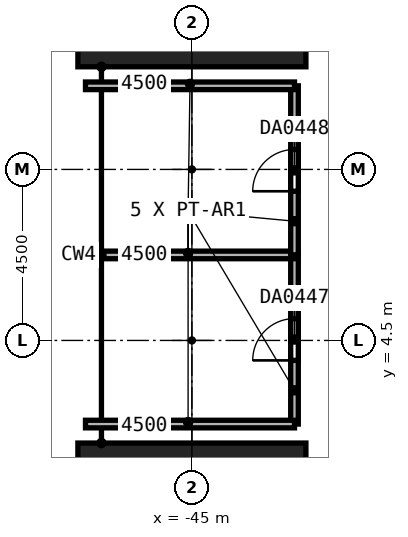
"""IFC4 building model, lengths in metres.
Left out: names, types, materials, properties, quantities, classifications, styles, units other than length and angle.
Written with IfcOpenShell. Run it as: python <this file> out.ifc"""

import sys

from ifc_helpers import new_model, si_unit, direction, frame, frame_2d, origin, origin_2d, place, context, subcontext, project, spatial, rectangle, extrude, element, fill, save


model = new_model("IFC4")
c1 = context("Model", 3, precision=1e-05, world=origin(), true_north=direction((0.0, 1.0)))
c2 = subcontext(c1, "Body", "Model", "MODEL_VIEW")
j1 = project(units=[si_unit("LENGTHUNIT", "METRE"), si_unit("PLANEANGLEUNIT", "RADIAN")], contexts=[c1])
p1 = place(None, origin())
s1 = spatial("IfcSite", under=j1, at=p1, CompositionType="ELEMENT")
p2 = place(p1, origin())
s2 = spatial("IfcBuilding", under=s1, at=p2, CompositionType="ELEMENT")
p3 = place(p2, frame((0.0, 0.0, 37.0)))
s3 = spatial("IfcBuildingStorey", under=s2, at=p3, CompositionType="ELEMENT", Elevation=37.0)
for number, where, z_axis, x_axis in (
    (1, (-45.0, 0.0, 0.0), (0.0, 0.0, 1.0), (0.0, 1.0, 0.0)),
    (2, (-45.0, 13.5, 0.0), (0.0, 0.0, 1.0), (0.0, 1.0, 0.0)),
):
    element("IfcColumn", number, at=place(p3, frame(where, z_axis=z_axis, x_axis=x_axis)), inside=s3, PredefinedType="COLUMN", context=c2, shape_type="SweptSolid", body=[
        extrude(rectangle(XDim=3.6, YDim=6.0, at=origin_2d()), origin(), (0.0, 0.0, 1.0), 5.8),
    ])
p4 = place(p3, frame((-42.3, 2.3, 0.0), z_axis=(0.0, 0.0, 1.0), x_axis=(0.0, 1.0, 0.0)))
e3 = element("IfcWall", 3, at=p4, inside=s3, PredefinedType="PARTITIONING", context=c2, shape_type="SweptSolid", body=[
    extrude(rectangle(XDim=4.45, YDim=0.2, at=frame_2d((2.225, 0.0))), origin(), (0.0, 0.0, 1.0), 6.7),
])
p5 = place(p4, frame((1.675, 0.0, 0.0)))
e4 = element("IfcOpeningElement", 4, at=p5, cuts=e3, PredefinedType="OPENING", context=c2, shape_type="SweptSolid", body=[
    extrude(rectangle(XDim=1.1, YDim=2.4, at=frame_2d((0.55, 1.2))), frame((0.0, 0.1, 0.0), z_axis=(0.0, -1.0, 0.0), x_axis=(1.0, 0.0, 0.0)), (0.0, 0.0, 1.0), 0.2),
])
for number, where, z_axis, x_axis in (
    (5, (-42.3, 2.3, 0.0), (0.0, 0.0, 1.0), (-1.0, 0.0, 0.0)),
    (6, (-47.8, 6.75, 0.0), (0.0, 0.0, 1.0), (1.0, 0.0, 0.0)),
):
    element("IfcWall", number, at=place(p3, frame(where, z_axis=z_axis, x_axis=x_axis)), inside=s3, PredefinedType="PARTITIONING", context=c2, shape_type="SweptSolid", body=[
        extrude(rectangle(XDim=5.5, YDim=0.2, at=frame_2d((2.75, 0.0))), origin(), (0.0, 0.0, 1.0), 6.7),
    ])
p6 = place(p3, frame((-42.3, 6.75, 0.0), z_axis=(0.0, 0.0, 1.0), x_axis=(0.0, 1.0, 0.0)))
e7 = element("IfcWall", 7, at=p6, inside=s3, PredefinedType="PARTITIONING", context=c2, shape_type="SweptSolid", body=[
    extrude(rectangle(XDim=4.45, YDim=0.2, at=frame_2d((2.225, 0.0))), origin(), (0.0, 0.0, 1.0), 6.7),
])
p7 = place(p6, frame((1.675, 0.0, 0.0)))
e8 = element("IfcOpeningElement", 8, at=p7, cuts=e7, PredefinedType="OPENING", context=c2, shape_type="SweptSolid", body=[
    extrude(rectangle(XDim=1.1, YDim=2.4, at=frame_2d((0.55, 1.2))), frame((0.0, 0.1, 0.0), z_axis=(0.0, -1.0, 0.0), x_axis=(1.0, 0.0, 0.0)), (0.0, 0.0, 1.0), 0.2),
])
p8 = place(p3, frame((-42.3, 11.2, 0.0), z_axis=(0.0, 0.0, 1.0), x_axis=(-1.0, 0.0, 0.0)))
e9 = element("IfcWall", 9, at=p8, inside=s3, PredefinedType="PARTITIONING", context=c2, shape_type="SweptSolid", body=[
    extrude(rectangle(XDim=5.5, YDim=0.2, at=frame_2d((2.75, 0.0))), origin(), (0.0, 0.0, 1.0), 6.7),
])
p9 = place(p5, origin())
e10 = element("IfcDoor", 10, at=p9, inside=s3, OperationType="DOUBLE_DOOR_SINGLE_SWING", PredefinedType="DOOR", context=c2, shape_type="SweptSolid", body=[
    extrude(rectangle(XDim=1.1, YDim=2.4, at=frame_2d((0.55, 1.2))), frame((0.0, 0.025, 0.0), z_axis=(0.0, -1.0, 0.0), x_axis=(1.0, 0.0, 0.0)), (0.0, 0.0, 1.0), 0.05),
])
fill(e4, e10)
p10 = place(p7, origin())
e11 = element("IfcDoor", 11, at=p10, inside=s3, OperationType="DOUBLE_DOOR_SINGLE_SWING", PredefinedType="DOOR", context=c2, shape_type="SweptSolid", body=[
    extrude(rectangle(XDim=1.1, YDim=2.4, at=frame_2d((0.55, 1.2))), frame((0.0, 0.025, 0.0), z_axis=(0.0, -1.0, 0.0), x_axis=(1.0, 0.0, 0.0)), (0.0, 0.0, 1.0), 0.05),
])
fill(e8, e11)
save(model, sys.argv[1])
